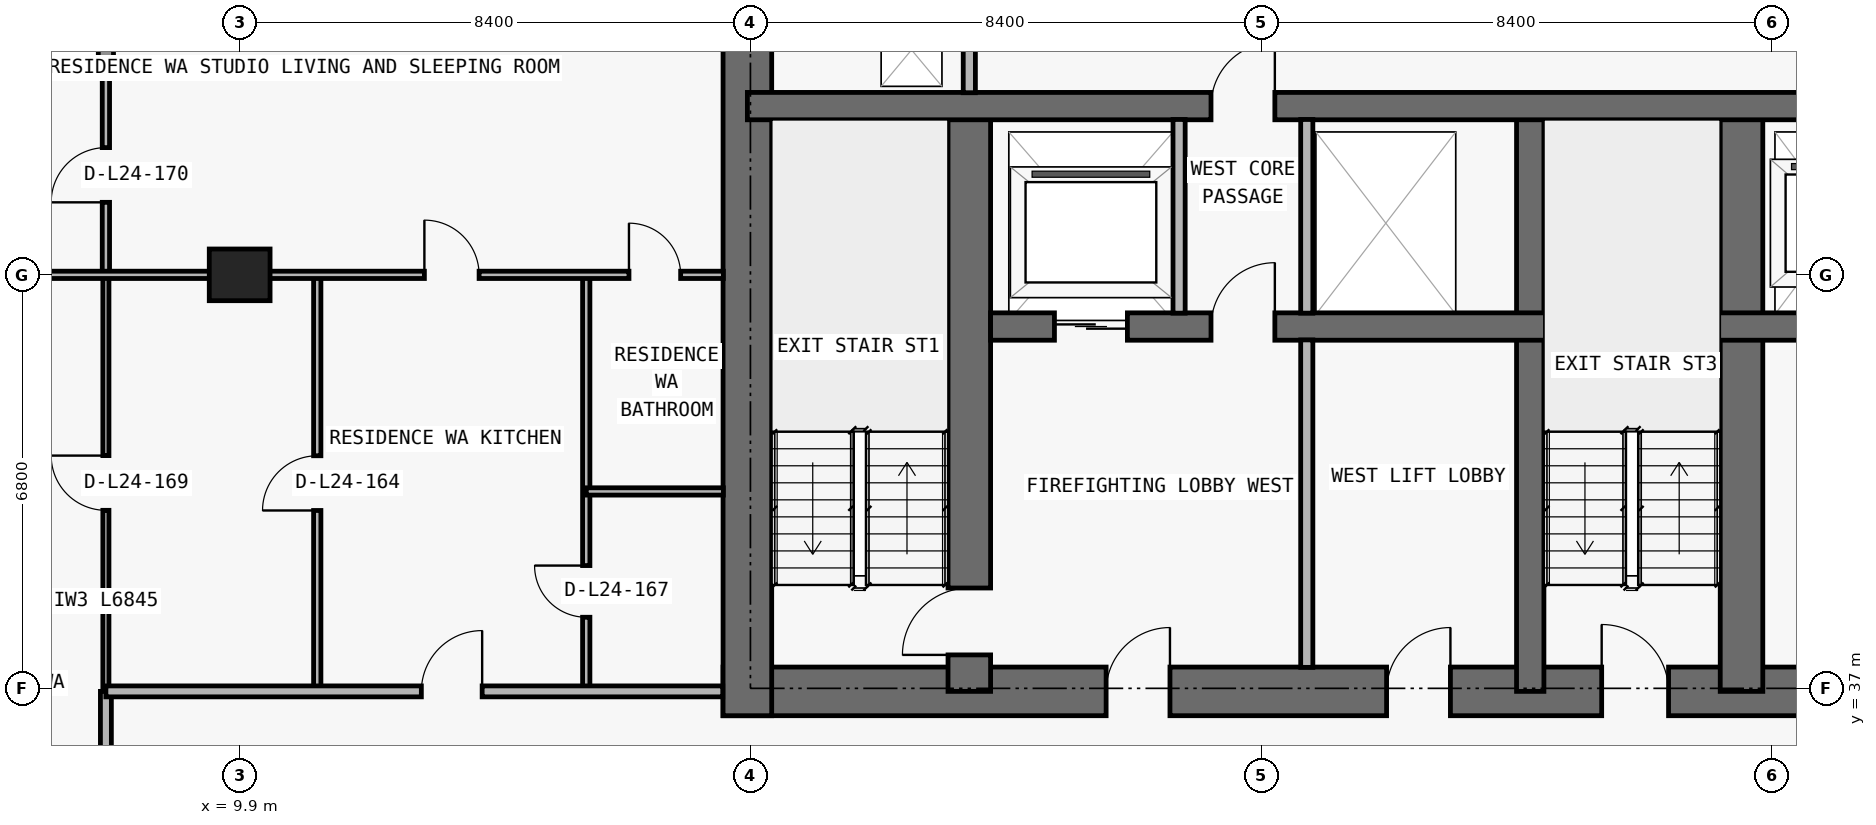
"""IFC4 building model, lengths in metres.
Left out: names, types, materials, properties, quantities, classifications, styles, units other than length and angle.
Written with IfcOpenShell. Run it as: python <this file> out.ifc"""

import sys

from ifc_helpers import new_model, si_unit, direction, frame, frame_2d, origin, origin_2d, place, context, subcontext, project, spatial, rectangle, extrude, element, fill, save


model = new_model("IFC4")
c1 = context("Model", 3, precision=1e-05, world=origin(), true_north=direction((0.0, 1.0)))
c2 = subcontext(c1, "Body", "Model", "MODEL_VIEW")
j1 = project(units=[si_unit("LENGTHUNIT", "METRE"), si_unit("PLANEANGLEUNIT", "RADIAN")], contexts=[c1])
p1 = place(None, origin())
s1 = spatial("IfcSite", under=j1, at=p1, CompositionType="ELEMENT")
p2 = place(p1, origin())
s2 = spatial("IfcBuilding", under=s1, at=p2, CompositionType="ELEMENT")
p3 = place(p2, frame((0.0, 0.0, 91.2)))
s3 = spatial("IfcBuildingStorey", under=s2, at=p3, CompositionType="ELEMENT", Elevation=91.2)
p4 = place(p3, frame((9.9, 43.8, 0.0), z_axis=(0.0, 0.0, 1.0), x_axis=(1.0, 0.0, 0.0)))
e1 = element("IfcColumn", 1, at=p4, inside=s3, PredefinedType="COLUMN", context=c2, shape_type="SweptSolid", body=[
    extrude(rectangle(XDim=1.0, YDim=0.85, at=origin_2d()), origin(), (0.0, 0.0, 1.0), 3.05),
])
p5 = place(p3, frame((17.85, 36.95, 0.0), z_axis=(0.0, 0.0, 1.0), x_axis=(1.0, 0.0, 0.0)))
e2 = element("IfcWall", 2, at=p5, inside=s3, PredefinedType="SHEAR", context=c2, shape_type="SweptSolid", body=[
    extrude(rectangle(XDim=42.1, YDim=0.8, at=frame_2d((21.05, 0.0))), origin(), (0.0, 0.0, 1.0), 3.05),
])
p6 = place(p5, frame((14.45, 0.0, 0.0)))
e3 = element("IfcOpeningElement", 3, at=p6, cuts=e2, PredefinedType="OPENING", context=c2, shape_type="SweptSolid", body=[
    extrude(rectangle(XDim=1.1, YDim=2.15, at=frame_2d((0.55, 1.075))), frame((0.0, 0.41, 0.0), z_axis=(0.0, -1.0, 0.0), x_axis=(1.0, 0.0, 0.0)), (0.0, 0.0, 1.0), 0.82),
])
p7 = place(p5, frame((6.3, 0.0, 0.0)))
e4 = element("IfcOpeningElement", 4, at=p7, cuts=e2, PredefinedType="OPENING", context=c2, shape_type="SweptSolid", body=[
    extrude(rectangle(XDim=1.05, YDim=2.15, at=frame_2d((0.525, 1.075))), frame((0.0, 0.41, 0.0), z_axis=(0.0, -1.0, 0.0), x_axis=(1.0, 0.0, 0.0)), (0.0, 0.0, 1.0), 0.82),
])
p8 = place(p5, frame((34.8, 0.0, 0.0)))
e5 = element("IfcOpeningElement", 5, at=p8, cuts=e2, PredefinedType="OPENING", context=c2, shape_type="SweptSolid", body=[
    extrude(rectangle(XDim=1.05, YDim=2.15, at=frame_2d((0.525, 1.075))), frame((0.0, 0.41, 0.0), z_axis=(0.0, -1.0, 0.0), x_axis=(1.0, 0.0, 0.0)), (0.0, 0.0, 1.0), 0.82),
])
p9 = place(p5, frame((10.913, 0.0, 0.0)))
e6 = element("IfcOpeningElement", 6, at=p9, cuts=e2, PredefinedType="OPENING", context=c2, shape_type="SweptSolid", body=[
    extrude(rectangle(XDim=1.05, YDim=2.15, at=frame_2d((0.525, 1.075))), frame((0.0, 0.41, 0.0), z_axis=(0.0, -1.0, 0.0), x_axis=(1.0, 0.0, 0.0)), (0.0, 0.0, 1.0), 0.82),
])
p10 = place(p5, frame((24.15, 0.0, 0.0)))
e7 = element("IfcOpeningElement", 7, at=p10, cuts=e2, PredefinedType="OPENING", context=c2, shape_type="SweptSolid", body=[
    extrude(rectangle(XDim=1.05, YDim=2.15, at=frame_2d((0.525, 1.075))), frame((0.0, 0.41, 0.0), z_axis=(0.0, -1.0, 0.0), x_axis=(1.0, 0.0, 0.0)), (0.0, 0.0, 1.0), 0.82),
])
p11 = place(p3, frame((18.25, 36.55, 0.0), z_axis=(0.0, 0.0, 1.0), x_axis=(0.0, 1.0, 0.0)))
e8 = element("IfcWall", 8, at=p11, inside=s3, PredefinedType="SHEAR", context=c2, shape_type="SweptSolid", body=[
    extrude(rectangle(XDim=14.05, YDim=0.8, at=frame_2d((7.025, 0.0))), origin(), (0.0, 0.0, 1.0), 3.05),
])
p12 = place(p3, frame((21.9, 36.95, 0.0), z_axis=(0.0, 0.0, 1.0), x_axis=(0.0, 1.0, 0.0)))
e9 = element("IfcWall", 9, at=p12, inside=s3, PredefinedType="SHEAR", context=c2, shape_type="SweptSolid", body=[
    extrude(rectangle(XDim=9.625, YDim=0.7, at=frame_2d((4.812, 0.0))), origin(), (0.0, 0.0, 1.0), 3.05),
])
p13 = place(p12, frame((0.6, 0.0, 0.0)))
e10 = element("IfcOpeningElement", 10, at=p13, cuts=e9, PredefinedType="OPENING", context=c2, shape_type="SweptSolid", body=[
    extrude(rectangle(XDim=1.1, YDim=2.15, at=frame_2d((0.55, 1.075))), frame((0.0, 0.36, 0.0), z_axis=(0.0, -1.0, 0.0), x_axis=(1.0, 0.0, 0.0)), (0.0, 0.0, 1.0), 0.72),
])
p14 = place(p3, frame((31.125, 36.95, 0.0), z_axis=(0.0, 0.0, 1.0), x_axis=(0.0, 1.0, 0.0)))
e11 = element("IfcWall", 11, at=p14, inside=s3, PredefinedType="SHEAR", context=c2, shape_type="SweptSolid", body=[
    extrude(rectangle(XDim=9.625, YDim=0.45, at=frame_2d((4.812, 0.0))), origin(), (0.0, 0.0, 1.0), 3.05),
])
p15 = place(p3, frame((34.6, 36.95, 0.0), z_axis=(0.0, 0.0, 1.0), x_axis=(0.0, 1.0, 0.0)))
e12 = element("IfcWall", 12, at=p15, inside=s3, PredefinedType="SHEAR", context=c2, shape_type="SweptSolid", body=[
    extrude(rectangle(XDim=9.625, YDim=0.7, at=frame_2d((4.812, 0.0))), origin(), (0.0, 0.0, 1.0), 3.05),
])
p16 = place(p3, frame((22.25, 42.95, 0.0), z_axis=(0.0, 0.0, 1.0), x_axis=(1.0, 0.0, 0.0)))
e13 = element("IfcWall", 13, at=p16, inside=s3, PredefinedType="SHEAR", context=c2, shape_type="SweptSolid", body=[
    extrude(rectangle(XDim=33.3, YDim=0.45, at=frame_2d((16.65, 0.0))), origin(), (0.0, 0.0, 1.0), 3.05),
])
p17 = place(p16, frame((1.05, 0.0, 0.0)))
e14 = element("IfcOpeningElement", 14, at=p17, cuts=e13, PredefinedType="OPENING", context=c2, shape_type="SweptSolid", body=[
    extrude(rectangle(XDim=1.2, YDim=2.2, at=frame_2d((0.6, 1.1))), frame((0.0, 0.235, 0.0), z_axis=(0.0, -1.0, 0.0), x_axis=(1.0, 0.0, 0.0)), (0.0, 0.0, 1.0), 0.47),
])
p18 = place(p16, frame((31.05, 0.0, 0.0)))
e15 = element("IfcOpeningElement", 15, at=p18, cuts=e13, PredefinedType="OPENING", context=c2, shape_type="SweptSolid", body=[
    extrude(rectangle(XDim=1.2, YDim=2.2, at=frame_2d((0.6, 1.1))), frame((0.0, 0.235, 0.0), z_axis=(0.0, -1.0, 0.0), x_axis=(1.0, 0.0, 0.0)), (0.0, 0.0, 1.0), 0.47),
])
p19 = place(p16, frame((13.5, 0.0, 0.0)))
e16 = element("IfcOpeningElement", 16, at=p19, cuts=e13, PredefinedType="OPENING", context=c2, shape_type="SweptSolid", body=[
    extrude(rectangle(XDim=1.1, YDim=2.2, at=frame_2d((0.55, 1.1))), frame((0.0, 0.235, 0.0), z_axis=(0.0, -1.0, 0.0), x_axis=(1.0, 0.0, 0.0)), (0.0, 0.0, 1.0), 0.47),
])
p20 = place(p16, frame((16.1, 0.0, 0.0)))
e17 = element("IfcOpeningElement", 17, at=p20, cuts=e13, PredefinedType="OPENING", context=c2, shape_type="SweptSolid", body=[
    extrude(rectangle(XDim=1.1, YDim=2.2, at=frame_2d((0.55, 1.1))), frame((0.0, 0.235, 0.0), z_axis=(0.0, -1.0, 0.0), x_axis=(1.0, 0.0, 0.0)), (0.0, 0.0, 1.0), 0.47),
])
p21 = place(p16, frame((18.7, 0.0, 0.0)))
e18 = element("IfcOpeningElement", 18, at=p21, cuts=e13, PredefinedType="OPENING", context=c2, shape_type="SweptSolid", body=[
    extrude(rectangle(XDim=1.1, YDim=2.2, at=frame_2d((0.55, 1.1))), frame((0.0, 0.235, 0.0), z_axis=(0.0, -1.0, 0.0), x_axis=(1.0, 0.0, 0.0)), (0.0, 0.0, 1.0), 0.47),
])
p22 = place(p16, frame((3.625, 0.0, 0.0)))
e19 = element("IfcOpeningElement", 19, at=p22, cuts=e13, PredefinedType="OPENING", context=c2, shape_type="SweptSolid", body=[
    extrude(rectangle(XDim=1.05, YDim=2.15, at=frame_2d((0.525, 1.075))), frame((0.0, 0.235, 0.0), z_axis=(0.0, -1.0, 0.0), x_axis=(1.0, 0.0, 0.0)), (0.0, 0.0, 1.0), 0.47),
])
p23 = place(p16, frame((28.675, 0.0, 0.0)))
e20 = element("IfcOpeningElement", 20, at=p23, cuts=e13, PredefinedType="OPENING", context=c2, shape_type="SweptSolid", body=[
    extrude(rectangle(XDim=1.05, YDim=2.15, at=frame_2d((0.525, 1.075))), frame((0.0, 0.235, 0.0), z_axis=(0.0, -1.0, 0.0), x_axis=(1.0, 0.0, 0.0)), (0.0, 0.0, 1.0), 0.47),
])
p24 = place(p3, frame((18.25, 46.575, 0.0), z_axis=(0.0, 0.0, 1.0), x_axis=(1.0, 0.0, 0.0)))
e21 = element("IfcWall", 21, at=p24, inside=s3, PredefinedType="SHEAR", context=c2, shape_type="SweptSolid", body=[
    extrude(rectangle(XDim=41.3, YDim=0.45, at=frame_2d((20.65, 0.0))), origin(), (0.0, 0.0, 1.0), 3.05),
])
p25 = place(p24, frame((7.625, 0.0, 0.0)))
e22 = element("IfcOpeningElement", 22, at=p25, cuts=e21, PredefinedType="OPENING", context=c2, shape_type="SweptSolid", body=[
    extrude(rectangle(XDim=1.05, YDim=2.15, at=frame_2d((0.525, 1.075))), frame((0.0, 0.235, 0.0), z_axis=(0.0, -1.0, 0.0), x_axis=(1.0, 0.0, 0.0)), (0.0, 0.0, 1.0), 0.47),
])
p26 = place(p24, frame((32.675, 0.0, 0.0)))
e23 = element("IfcOpeningElement", 23, at=p26, cuts=e21, PredefinedType="OPENING", context=c2, shape_type="SweptSolid", body=[
    extrude(rectangle(XDim=1.05, YDim=2.15, at=frame_2d((0.525, 1.075))), frame((0.0, 0.235, 0.0), z_axis=(0.0, -1.0, 0.0), x_axis=(1.0, 0.0, 0.0)), (0.0, 0.0, 1.0), 0.47),
])
p27 = place(p3, frame((4.05, 47.2, 0.0), z_axis=(0.0, 0.0, 1.0), x_axis=(1.0, 0.0, 0.0)))
e24 = element("IfcWall", 24, at=p27, inside=s3, PredefinedType="ELEMENTEDWALL", context=c2, shape_type="SweptSolid", body=[
    extrude(rectangle(XDim=3.65, YDim=0.25, at=frame_2d((1.825, 0.0))), origin(), (0.0, 0.0, 1.0), 3.05),
])
p28 = place(p3, frame((7.7, 47.2, 0.0), z_axis=(0.0, 0.0, 1.0), x_axis=(0.0, 1.0, 0.0)))
e25 = element("IfcWall", 25, at=p28, inside=s3, PredefinedType="ELEMENTEDWALL", context=c2, shape_type="SweptSolid", body=[
    extrude(rectangle(XDim=3.25, YDim=0.25, at=frame_2d((1.625, 0.0))), origin(), (0.0, 0.0, 1.0), 3.05),
])
p29 = place(p3, frame((7.7, 33.805, 0.0), z_axis=(0.0, 0.0, 1.0), x_axis=(0.0, 1.0, 0.0)))
e26 = element("IfcWall", 26, at=p29, inside=s3, PredefinedType="PARTITIONING", context=c2, shape_type="SweptSolid", body=[
    extrude(rectangle(XDim=3.145, YDim=0.18, at=frame_2d((1.573, 0.0))), origin(), (0.0, 0.0, 1.0), 3.05),
])
p30 = place(p3, frame((7.7, 36.955, 0.0), z_axis=(0.0, 0.0, 1.0), x_axis=(0.0, 1.0, 0.0)))
e27 = element("IfcWall", 27, at=p30, inside=s3, PredefinedType="MOVABLE", context=c2, shape_type="SweptSolid", body=[
    extrude(rectangle(XDim=6.845, YDim=0.1, at=frame_2d((3.422, 0.0))), origin(), (0.0, 0.0, 1.0), 3.05),
])
p31 = place(p30, frame((2.972, 0.0, 0.0)))
e28 = element("IfcOpeningElement", 28, at=p31, cuts=e27, PredefinedType="OPENING", context=c2, shape_type="SweptSolid", body=[
    extrude(rectangle(XDim=0.9, YDim=2.15, at=frame_2d((0.45, 1.075))), frame((0.0, 0.06, 0.0), z_axis=(0.0, -1.0, 0.0), x_axis=(1.0, 0.0, 0.0)), (0.0, 0.0, 1.0), 0.12),
])
p32 = place(p3, frame((7.7, 43.805, 0.0), z_axis=(0.0, 0.0, 1.0), x_axis=(0.0, 1.0, 0.0)))
e29 = element("IfcWall", 29, at=p32, inside=s3, PredefinedType="PARTITIONING", context=c2, shape_type="SweptSolid", body=[
    extrude(rectangle(XDim=3.275, YDim=0.12, at=frame_2d((1.638, 0.0))), origin(), (0.0, 0.0, 1.0), 3.05),
])
p33 = place(p32, frame((1.188, 0.0, 0.0)))
e30 = element("IfcOpeningElement", 30, at=p33, cuts=e29, PredefinedType="OPENING", context=c2, shape_type="SweptSolid", body=[
    extrude(rectangle(XDim=0.9, YDim=2.15, at=frame_2d((0.45, 1.075))), frame((0.0, 0.07, 0.0), z_axis=(0.0, -1.0, 0.0), x_axis=(1.0, 0.0, 0.0)), (0.0, 0.0, 1.0), 0.14),
])
p34 = place(p3, frame((11.176, 36.95, 0.0), z_axis=(0.0, 0.0, 1.0), x_axis=(0.0, 1.0, 0.0)))
e31 = element("IfcWall", 31, at=p34, inside=s3, PredefinedType="PARTITIONING", context=c2, shape_type="SweptSolid", body=[
    extrude(rectangle(XDim=6.85, YDim=0.12, at=frame_2d((3.425, 0.0))), origin(), (0.0, 0.0, 1.0), 3.05),
])
p35 = place(p34, frame((2.975, 0.0, 0.0)))
e32 = element("IfcOpeningElement", 32, at=p35, cuts=e31, PredefinedType="OPENING", context=c2, shape_type="SweptSolid", body=[
    extrude(rectangle(XDim=0.9, YDim=2.15, at=frame_2d((0.45, 1.075))), frame((0.0, 0.07, 0.0), z_axis=(0.0, -1.0, 0.0), x_axis=(1.0, 0.0, 0.0)), (0.0, 0.0, 1.0), 0.14),
])
p36 = place(p3, frame((15.6, 36.95, 0.0), z_axis=(0.0, 0.0, 1.0), x_axis=(0.0, 1.0, 0.0)))
e33 = element("IfcWall", 33, at=p36, inside=s3, PredefinedType="PARTITIONING", context=c2, shape_type="SweptSolid", body=[
    extrude(rectangle(XDim=6.85, YDim=0.12, at=frame_2d((3.425, 0.0))), origin(), (0.0, 0.0, 1.0), 2.578),
])
p37 = place(p36, frame((1.219, 0.0, 0.0)))
e34 = element("IfcOpeningElement", 34, at=p37, cuts=e33, PredefinedType="OPENING", context=c2, shape_type="SweptSolid", body=[
    extrude(rectangle(XDim=0.85, YDim=2.1, at=frame_2d((0.425, 1.05))), frame((0.0, 0.07, 0.0), z_axis=(0.0, -1.0, 0.0), x_axis=(1.0, 0.0, 0.0)), (0.0, 0.0, 1.0), 0.14),
])
p38 = place(p3, frame((21.9, 46.795, 0.0), z_axis=(0.0, 0.0, 1.0), x_axis=(0.0, 1.0, 0.0)))
e35 = element("IfcWall", 35, at=p38, inside=s3, PredefinedType="PARTITIONING", context=c2, shape_type="SweptSolid", body=[
    extrude(rectangle(XDim=3.06, YDim=0.2, at=frame_2d((1.53, 0.0))), origin(), (0.0, 0.0, 1.0), 3.05),
])
p39 = place(p3, frame((25.35, 43.17, 0.0), z_axis=(0.0, 0.0, 1.0), x_axis=(0.0, 1.0, 0.0)))
e36 = element("IfcWall", 36, at=p39, inside=s3, PredefinedType="PARTITIONING", context=c2, shape_type="SweptSolid", body=[
    extrude(rectangle(XDim=3.185, YDim=0.2, at=frame_2d((1.593, 0.0))), origin(), (0.0, 0.0, 1.0), 3.05),
])
p40 = place(p3, frame((27.45, 37.345, 0.0), z_axis=(0.0, 0.0, 1.0), x_axis=(0.0, 1.0, 0.0)))
e37 = element("IfcWall", 37, at=p40, inside=s3, PredefinedType="PARTITIONING", context=c2, shape_type="SweptSolid", body=[
    extrude(rectangle(XDim=5.385, YDim=0.2, at=frame_2d((2.692, 0.0))), origin(), (0.0, 0.0, 1.0), 3.05),
])
p41 = place(p3, frame((27.45, 43.17, 0.0), z_axis=(0.0, 0.0, 1.0), x_axis=(0.0, 1.0, 0.0)))
e38 = element("IfcWall", 38, at=p41, inside=s3, PredefinedType="PARTITIONING", context=c2, shape_type="SweptSolid", body=[
    extrude(rectangle(XDim=3.185, YDim=0.2, at=frame_2d((1.593, 0.0))), origin(), (0.0, 0.0, 1.0), 3.05),
])
p42 = place(p3, frame((7.7, 36.95, 0.0), z_axis=(0.0, 0.0, 1.0), x_axis=(1.0, 0.0, 0.0)))
e39 = element("IfcWall", 39, at=p42, inside=s3, PredefinedType="PARTITIONING", context=c2, shape_type="SweptSolid", body=[
    extrude(rectangle(XDim=10.145, YDim=0.18, at=frame_2d((5.073, 0.0))), origin(), (0.0, 0.0, 1.0), 3.05),
])
p43 = place(p42, frame((5.188, 0.0, 0.0)))
e40 = element("IfcOpeningElement", 40, at=p43, cuts=e39, PredefinedType="OPENING", context=c2, shape_type="SweptSolid", body=[
    extrude(rectangle(XDim=1.0, YDim=2.2, at=frame_2d((0.5, 1.1))), frame((0.0, 0.1, 0.0), z_axis=(0.0, -1.0, 0.0), x_axis=(1.0, 0.0, 0.0)), (0.0, 0.0, 1.0), 0.2),
])
p44 = place(p3, frame((15.6, 40.238, 0.0), z_axis=(0.0, 0.0, 1.0), x_axis=(1.0, 0.0, 0.0)))
e41 = element("IfcWall", 41, at=p44, inside=s3, PredefinedType="PARTITIONING", context=c2, shape_type="SweptSolid", body=[
    extrude(rectangle(XDim=2.255, YDim=0.12, at=frame_2d((1.127, 0.0))), origin(), (0.0, 0.0, 1.0), 3.05),
])
p45 = place(p3, frame((4.195, 43.8, 0.0), z_axis=(0.0, 0.0, 1.0), x_axis=(1.0, 0.0, 0.0)))
e42 = element("IfcWall", 42, at=p45, inside=s3, PredefinedType="PARTITIONING", context=c2, shape_type="SweptSolid", body=[
    extrude(rectangle(XDim=13.66, YDim=0.12, at=frame_2d((6.83, 0.0))), origin(), (0.0, 0.0, 1.0), 2.339),
])
p46 = place(p45, frame((8.743, 0.0, 0.0)))
e43 = element("IfcOpeningElement", 43, at=p46, cuts=e42, PredefinedType="OPENING", context=c2, shape_type="SweptSolid", body=[
    extrude(rectangle(XDim=0.9, YDim=2.15, at=frame_2d((0.45, 1.075))), frame((0.0, 0.07, 0.0), z_axis=(0.0, -1.0, 0.0), x_axis=(1.0, 0.0, 0.0)), (0.0, 0.0, 1.0), 0.14),
])
p47 = place(p45, frame((12.107, 0.0, 0.0)))
e44 = element("IfcOpeningElement", 44, at=p47, cuts=e42, PredefinedType="OPENING", context=c2, shape_type="SweptSolid", body=[
    extrude(rectangle(XDim=0.85, YDim=2.1, at=frame_2d((0.425, 1.05))), frame((0.0, 0.07, 0.0), z_axis=(0.0, -1.0, 0.0), x_axis=(1.0, 0.0, 0.0)), (0.0, 0.0, 1.0), 0.14),
])
p48 = place(p17, origin())
e45 = element("IfcDoor", 45, at=p48, inside=s3, OperationType="DOUBLE_DOOR_SLIDING", PredefinedType="DOOR", context=c2, shape_type="SweptSolid", body=[
    extrude(rectangle(XDim=1.2, YDim=2.2, at=frame_2d((0.6, 1.1))), frame((0.0, 0.025, 0.0), z_axis=(0.0, -1.0, 0.0), x_axis=(1.0, 0.0, 0.0)), (0.0, 0.0, 1.0), 0.05),
])
fill(e14, e45)
p49 = place(p6, origin())
e46 = element("IfcDoor", 46, at=p49, inside=s3, OperationType="SINGLE_SWING_LEFT", PredefinedType="DOOR", context=c2, shape_type="SweptSolid", body=[
    extrude(rectangle(XDim=1.1, YDim=2.15, at=frame_2d((0.55, 1.075))), frame((0.0, 0.025, 0.0), z_axis=(0.0, -1.0, 0.0), x_axis=(1.0, 0.0, 0.0)), (0.0, 0.0, 1.0), 0.05),
])
fill(e3, e46)
p50 = place(p7, origin())
e47 = element("IfcDoor", 47, at=p50, inside=s3, OperationType="SINGLE_SWING_RIGHT", PredefinedType="DOOR", context=c2, shape_type="SweptSolid", body=[
    extrude(rectangle(XDim=1.05, YDim=2.15, at=frame_2d((0.525, 1.075))), frame((0.0, 0.025, 0.0), z_axis=(0.0, -1.0, 0.0), x_axis=(1.0, 0.0, 0.0)), (0.0, 0.0, 1.0), 0.05),
])
fill(e4, e47)
p51 = place(p13, origin())
e48 = element("IfcDoor", 48, at=p51, inside=s3, OperationType="SINGLE_SWING_LEFT", PredefinedType="DOOR", context=c2, shape_type="SweptSolid", body=[
    extrude(rectangle(XDim=1.1, YDim=2.15, at=frame_2d((0.55, 1.075))), frame((0.0, 0.025, 0.0), z_axis=(0.0, -1.0, 0.0), x_axis=(1.0, 0.0, 0.0)), (0.0, 0.0, 1.0), 0.05),
])
fill(e10, e48)
p52 = place(p22, origin())
e49 = element("IfcDoor", 49, at=p52, inside=s3, OperationType="SINGLE_SWING_RIGHT", PredefinedType="DOOR", context=c2, shape_type="SweptSolid", body=[
    extrude(rectangle(XDim=1.05, YDim=2.15, at=frame_2d((0.525, 1.075))), frame((0.0, 0.025, 0.0), z_axis=(0.0, -1.0, 0.0), x_axis=(1.0, 0.0, 0.0)), (0.0, 0.0, 1.0), 0.05),
])
fill(e19, e49)
p53 = place(p9, origin())
e50 = element("IfcDoor", 50, at=p53, inside=s3, OperationType="SINGLE_SWING_RIGHT", PredefinedType="DOOR", context=c2, shape_type="SweptSolid", body=[
    extrude(rectangle(XDim=1.05, YDim=2.15, at=frame_2d((0.525, 1.075))), frame((0.0, 0.025, 0.0), z_axis=(0.0, -1.0, 0.0), x_axis=(1.0, 0.0, 0.0)), (0.0, 0.0, 1.0), 0.05),
])
fill(e6, e50)
p54 = place(p25, origin())
e51 = element("IfcDoor", 51, at=p54, inside=s3, OperationType="SINGLE_SWING_RIGHT", PredefinedType="DOOR", context=c2, shape_type="SweptSolid", body=[
    extrude(rectangle(XDim=1.05, YDim=2.15, at=frame_2d((0.525, 1.075))), frame((0.0, 0.025, 0.0), z_axis=(0.0, -1.0, 0.0), x_axis=(1.0, 0.0, 0.0)), (0.0, 0.0, 1.0), 0.05),
])
fill(e22, e51)
p55 = place(p35, origin())
e52 = element("IfcDoor", 52, at=p55, inside=s3, OperationType="SINGLE_SWING_LEFT", PredefinedType="DOOR", context=c2, shape_type="SweptSolid", body=[
    extrude(rectangle(XDim=0.9, YDim=2.15, at=frame_2d((0.45, 1.075))), frame((0.0, 0.025, 0.0), z_axis=(0.0, -1.0, 0.0), x_axis=(1.0, 0.0, 0.0)), (0.0, 0.0, 1.0), 0.05),
])
fill(e32, e52)
p56 = place(p43, origin())
e53 = element("IfcDoor", 53, at=p56, inside=s3, OperationType="SINGLE_SWING_RIGHT", PredefinedType="DOOR", context=c2, shape_type="SweptSolid", body=[
    extrude(rectangle(XDim=1.0, YDim=2.2, at=frame_2d((0.5, 1.1))), frame((0.0, 0.025, 0.0), z_axis=(0.0, -1.0, 0.0), x_axis=(1.0, 0.0, 0.0)), (0.0, 0.0, 1.0), 0.05),
])
fill(e40, e53)
p57 = place(p46, origin())
e54 = element("IfcDoor", 54, at=p57, inside=s3, OperationType="SINGLE_SWING_LEFT", PredefinedType="DOOR", context=c2, shape_type="SweptSolid", body=[
    extrude(rectangle(XDim=0.9, YDim=2.15, at=frame_2d((0.45, 1.075))), frame((0.0, 0.025, 0.0), z_axis=(0.0, -1.0, 0.0), x_axis=(1.0, 0.0, 0.0)), (0.0, 0.0, 1.0), 0.05),
])
fill(e43, e54)
p58 = place(p37, origin())
e55 = element("IfcDoor", 55, at=p58, inside=s3, OperationType="SINGLE_SWING_RIGHT", PredefinedType="DOOR", context=c2, shape_type="SweptSolid", body=[
    extrude(rectangle(XDim=0.85, YDim=2.1, at=frame_2d((0.425, 1.05))), frame((0.0, 0.025, 0.0), z_axis=(0.0, -1.0, 0.0), x_axis=(1.0, 0.0, 0.0)), (0.0, 0.0, 1.0), 0.05),
])
fill(e34, e55)
p59 = place(p47, origin())
e56 = element("IfcDoor", 56, at=p59, inside=s3, OperationType="SINGLE_SWING_LEFT", PredefinedType="DOOR", context=c2, shape_type="SweptSolid", body=[
    extrude(rectangle(XDim=0.85, YDim=2.1, at=frame_2d((0.425, 1.05))), frame((0.0, 0.025, 0.0), z_axis=(0.0, -1.0, 0.0), x_axis=(1.0, 0.0, 0.0)), (0.0, 0.0, 1.0), 0.05),
])
fill(e44, e56)
p60 = place(p31, origin())
e57 = element("IfcDoor", 57, at=p60, inside=s3, OperationType="SINGLE_SWING_RIGHT", PredefinedType="DOOR", context=c2, shape_type="SweptSolid", body=[
    extrude(rectangle(XDim=0.9, YDim=2.15, at=frame_2d((0.45, 1.075))), frame((0.0, 0.025, 0.0), z_axis=(0.0, -1.0, 0.0), x_axis=(1.0, 0.0, 0.0)), (0.0, 0.0, 1.0), 0.05),
])
fill(e28, e57)
p61 = place(p33, origin())
e58 = element("IfcDoor", 58, at=p61, inside=s3, OperationType="SINGLE_SWING_LEFT", PredefinedType="DOOR", context=c2, shape_type="SweptSolid", body=[
    extrude(rectangle(XDim=0.9, YDim=2.15, at=frame_2d((0.45, 1.075))), frame((0.0, 0.025, 0.0), z_axis=(0.0, -1.0, 0.0), x_axis=(1.0, 0.0, 0.0)), (0.0, 0.0, 1.0), 0.05),
])
fill(e30, e58)
save(model, sys.argv[1])
